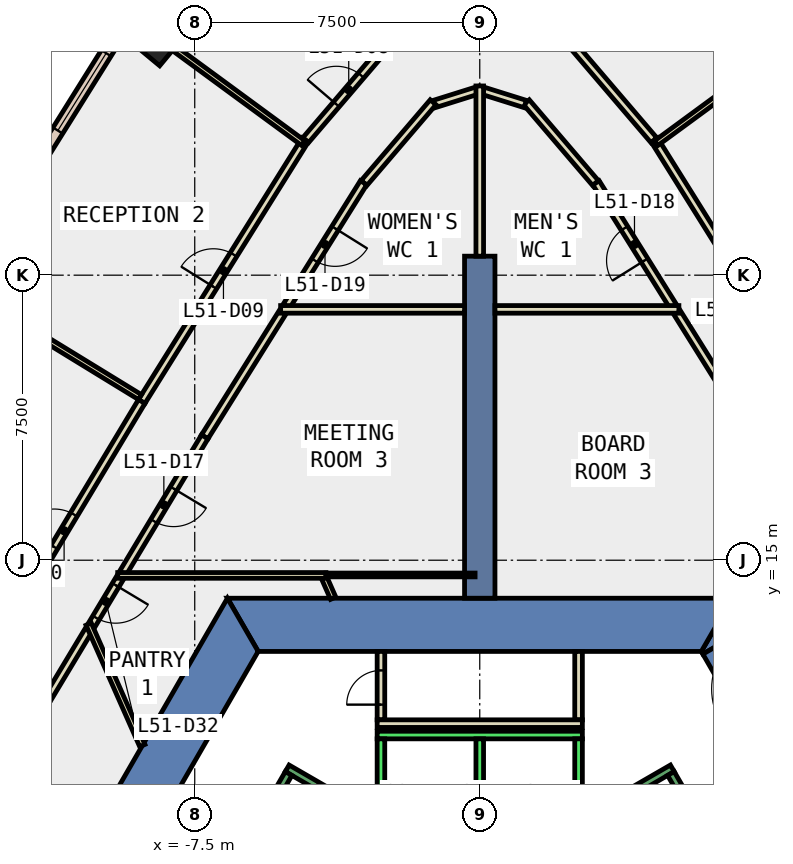
"""IFC4 building model, lengths in metres.
Left out: names, types, materials, properties, quantities, classifications, styles, units other than length and angle.
Written with IfcOpenShell. Run it as: python <this file> out.ifc"""

import sys

from ifc_helpers import new_model, si_unit, direction, frame, frame_2d, origin, origin_2d, place, context, subcontext, project, spatial, polyline, rectangle, outline, extrude, element, fill, save


model = new_model("IFC4")
c1 = context("Model", 3, precision=1e-05, world=origin(), true_north=direction((0.0, 1.0)))
c2 = subcontext(c1, "Body", "Model", "MODEL_VIEW")
j1 = project(units=[si_unit("LENGTHUNIT", "METRE"), si_unit("PLANEANGLEUNIT", "RADIAN")], contexts=[c1])
p1 = place(None, origin())
s1 = spatial("IfcSite", under=j1, at=p1, CompositionType="ELEMENT")
p2 = place(p1, origin())
s2 = spatial("IfcBuilding", under=s1, at=p2, CompositionType="ELEMENT")
p3 = place(p2, frame((0.0, 0.0, 227.6)))
s3 = spatial("IfcBuildingStorey", under=s2, at=p3, CompositionType="ELEMENT", Elevation=227.6)
p4 = place(p3, frame((-8.642, 28.842, -0.4), z_axis=(0.0, 0.0, 1.0), x_axis=(0.638660382845, 0.769488736359, 0.0)))
e1 = element("IfcColumn", 1, at=p4, inside=s3, PredefinedType="COLUMN", context=c2, shape_type="SweptSolid", body=[
    extrude(rectangle(XDim=1.0, YDim=1.4, at=origin_2d()), origin(), (0.0, 0.0, 1.0), 4.2),
])
p5 = place(p3, frame((0.0, 0.0, -0.4)))
e2 = element("IfcWall", 2, at=p5, inside=s3, PredefinedType="SHEAR", context=c2, shape_type="SweptSolid", body=[
    extrude(outline(polyline([(5.871, 12.53), (7.084, 13.23), (6.64, 14.0), (5.831, 12.6), (5.871, 12.53)])), origin(), (0.0, 0.0, 1.0), 4.2),
])
p6 = place(p3, frame((0.0, 0.0, 3.6)))
e3 = element("IfcWall", 3, at=p6, inside=s3, PredefinedType="SHEAR", context=c2, shape_type="SweptSolid", body=[
    extrude(outline(polyline([(7.084, 13.23), (5.871, 12.53), (6.871, 10.798), (8.084, 11.498), (7.084, 13.23)])), origin(), (0.0, 0.0, 1.0), 0.2),
])
p7 = place(p3, frame((0.0, 0.0, -0.4)))
e4 = element("IfcWall", 4, at=p7, inside=s3, PredefinedType="SHEAR", context=c2, shape_type="SweptSolid", body=[
    extrude(outline(polyline([(6.64, 14.0), (-6.64, 14.0), (-5.831, 12.6), (5.831, 12.6), (6.64, 14.0)])), origin(), (0.0, 0.0, 1.0), 4.2),
])
p8 = place(p3, frame((0.0, 0.0, -0.4)))
e5 = element("IfcWall", 5, at=p8, inside=s3, PredefinedType="SHEAR", context=c2, shape_type="SweptSolid", body=[
    extrude(outline(polyline([(-11.834, 5.002), (-10.622, 4.302), (-5.831, 12.6), (-6.64, 14.0), (-11.834, 5.002)])), origin(), (0.0, 0.0, 1.0), 4.2),
])
p9 = place(p3, frame((0.0, 14.0, -0.4), z_axis=(0.0, 0.0, 1.0), x_axis=(0.0, 1.0, 0.0)))
e6 = element("IfcWall", 6, at=p9, inside=s3, PredefinedType="SHEAR", context=c2, shape_type="SweptSolid", body=[
    extrude(rectangle(XDim=9.0, YDim=0.8, at=frame_2d((4.5, 0.0))), origin(), (0.0, 0.0, 1.0), 4.2),
])
p10 = place(p3, frame((-9.485, 28.893, 0.0), z_axis=(0.0, 0.0, 1.0), x_axis=(-0.530037467052, -0.847974223383, 0.0)))
e7 = element("IfcWall", 7, at=p10, inside=s3, PredefinedType="STANDARD", context=c2, shape_type="SweptSolid", body=[
    extrude(rectangle(XDim=7.405, YDim=0.3, at=frame_2d((3.702, 0.0))), origin(), (0.0, 0.0, 1.0), 3.8),
])
p11 = place(p10, frame((0.651, 0.0, 0.9)))
e8 = element("IfcOpeningElement", 8, at=p11, cuts=e7, PredefinedType="OPENING", context=c2, shape_type="SweptSolid", body=[
    extrude(rectangle(XDim=2.4, YDim=2.6, at=frame_2d((1.2, 1.3))), frame((0.0, 0.16, 0.0), z_axis=(0.0, -1.0, 0.0), x_axis=(1.0, 0.0, 0.0)), (0.0, 0.0, 1.0), 0.32),
])
p12 = place(p10, frame((4.354, 0.0, 0.9)))
e9 = element("IfcOpeningElement", 9, at=p12, cuts=e7, PredefinedType="OPENING", context=c2, shape_type="SweptSolid", body=[
    extrude(rectangle(XDim=2.4, YDim=2.6, at=frame_2d((1.2, 1.3))), frame((0.0, 0.16, 0.0), z_axis=(0.0, -1.0, 0.0), x_axis=(1.0, 0.0, 0.0)), (0.0, 0.0, 1.0), 0.32),
])
p13 = place(p3, frame((-9.466, 14.536, 0.0), z_axis=(0.0, 0.0, 1.0), x_axis=(-0.514545292, -0.857463201823, 0.0)))
e10 = element("IfcWall", 10, at=p13, inside=s3, PredefinedType="PARTITIONING", context=c2, shape_type="SweptSolid", body=[
    extrude(rectangle(XDim=1.449, YDim=0.2, at=frame_2d((0.725, 0.0))), origin(), (0.0, 0.0, 1.0), 3.8),
])
p14 = place(p13, frame((0.225, 0.0, 0.0)))
e11 = element("IfcOpeningElement", 11, at=p14, cuts=e10, PredefinedType="OPENING", context=c2, shape_type="SweptSolid", body=[
    extrude(rectangle(XDim=1.0, YDim=2.1, at=frame_2d((0.5, 1.05))), frame((0.0, 0.11, 0.0), z_axis=(0.0, -1.0, 0.0), x_axis=(1.0, 0.0, 0.0)), (0.0, 0.0, 1.0), 0.22),
])
p15 = place(p3, frame((-10.29, 13.164, 0.0), z_axis=(0.0, 0.0, 1.0), x_axis=(-0.514904735811, -0.857247404802, 0.0)))
e12 = element("IfcWall", 12, at=p15, inside=s3, PredefinedType="PARTITIONING", context=c2, shape_type="SweptSolid", body=[
    extrude(rectangle(XDim=2.194, YDim=0.2, at=frame_2d((1.097, 0.0))), origin(), (0.0, 0.0, 1.0), 3.8),
])
for number, where, z_axis, x_axis in (
    (13, (7.237, 18.246, 0.0), (0.0, 0.0, 1.0), (-0.53, 0.848, 0.0)),
    (14, (-5.193, 21.515, 0.0), (0.0, 0.0, 1.0), (-0.53, -0.848, 0.0)),
):
    element("IfcWall", number, at=place(p3, frame(where, z_axis=z_axis, x_axis=x_axis)), inside=s3, PredefinedType="PARTITIONING", context=c2, shape_type="SweptSolid", body=[
        extrude(rectangle(XDim=3.855, YDim=0.2, at=frame_2d((1.928, 0.0))), origin(), (0.0, 0.0, 1.0), 3.8),
    ])
p16 = place(p3, frame((-7.237, 18.246, 0.0), z_axis=(0.0, 0.0, 1.0), x_axis=(-0.514959644878, -0.857214421336, 0.0)))
e15 = element("IfcWall", 15, at=p16, inside=s3, PredefinedType="PARTITIONING", context=c2, shape_type="SweptSolid", body=[
    extrude(rectangle(XDim=4.179, YDim=0.2, at=frame_2d((2.089, 0.0))), origin(), (0.0, 0.0, 1.0), 3.8),
])
p17 = place(p16, frame((1.589, 0.0, 0.0)))
e16 = element("IfcOpeningElement", 16, at=p17, cuts=e15, PredefinedType="OPENING", context=c2, shape_type="SweptSolid", body=[
    extrude(rectangle(XDim=1.0, YDim=2.1, at=frame_2d((0.5, 1.05))), frame((0.0, 0.11, 0.0), z_axis=(0.0, -1.0, 0.0), x_axis=(1.0, 0.0, 0.0)), (0.0, 0.0, 1.0), 0.22),
])
p18 = place(p3, frame((5.087, 21.685, 0.0), z_axis=(0.0, 0.0, 1.0), x_axis=(-0.529998940003, 0.847998304005, 0.0)))
e17 = element("IfcWall", 17, at=p18, inside=s3, PredefinedType="PARTITIONING", context=c2, shape_type="SweptSolid", body=[
    extrude(rectangle(XDim=3.83, YDim=0.2, at=frame_2d((1.915, 0.0))), origin(), (0.0, 0.0, 1.0), 3.8),
])
p19 = place(p18, frame((1.416, 0.0, 0.0)))
e18 = element("IfcOpeningElement", 18, at=p19, cuts=e17, PredefinedType="OPENING", context=c2, shape_type="SweptSolid", body=[
    extrude(rectangle(XDim=1.0, YDim=2.1, at=frame_2d((0.5, 1.05))), frame((0.0, 0.11, 0.0), z_axis=(0.0, -1.0, 0.0), x_axis=(1.0, 0.0, 0.0)), (0.0, 0.0, 1.0), 0.22),
])
p20 = place(p3, frame((3.045, 24.925, 0.0), z_axis=(0.0, 0.0, 1.0), x_axis=(-0.650057725157, 0.759884829407, 0.0)))
e19 = element("IfcWall", 19, at=p20, inside=s3, PredefinedType="PARTITIONING", context=c2, shape_type="SweptSolid", body=[
    extrude(rectangle(XDim=2.796, YDim=0.2, at=frame_2d((1.398, 0.0))), origin(), (0.0, 0.0, 1.0), 3.8),
])
p21 = place(p3, frame((1.196, 27.004, 0.0), z_axis=(0.0, 0.0, 1.0), x_axis=(-0.954200976086, 0.29916633707, 0.0)))
e20 = element("IfcWall", 20, at=p21, inside=s3, PredefinedType="PARTITIONING", context=c2, shape_type="SweptSolid", body=[
    extrude(rectangle(XDim=1.154, YDim=0.2, at=frame_2d((0.577, 0.0))), origin(), (0.0, 0.0, 1.0), 3.8),
])
p22 = place(p3, frame((0.0, 27.379, 0.0), z_axis=(0.0, 0.0, 1.0), x_axis=(-0.954198830916, -0.299173179075, 0.0)))
e21 = element("IfcWall", 21, at=p22, inside=s3, PredefinedType="PARTITIONING", context=c2, shape_type="SweptSolid", body=[
    extrude(rectangle(XDim=1.253, YDim=0.2, at=frame_2d((0.627, 0.0))), origin(), (0.0, 0.0, 1.0), 3.8),
])
p23 = place(p3, frame((-1.227, 27.05, 0.0), z_axis=(0.0, 0.0, 1.0), x_axis=(-0.650057725157, -0.759884829407, 0.0)))
e22 = element("IfcWall", 22, at=p23, inside=s3, PredefinedType="PARTITIONING", context=c2, shape_type="SweptSolid", body=[
    extrude(rectangle(XDim=2.796, YDim=0.2, at=frame_2d((1.398, 0.0))), origin(), (0.0, 0.0, 1.0), 3.8),
])
p24 = place(p3, frame((-3.057, 24.933, 0.0), z_axis=(0.0, 0.0, 1.0), x_axis=(-0.529998940003, -0.847998304005, 0.0)))
e23 = element("IfcWall", 23, at=p24, inside=s3, PredefinedType="PARTITIONING", context=c2, shape_type="SweptSolid", body=[
    extrude(rectangle(XDim=3.83, YDim=0.2, at=frame_2d((1.915, 0.0))), origin(), (0.0, 0.0, 1.0), 3.8),
])
p25 = place(p24, frame((1.416, 0.0, 0.0)))
e24 = element("IfcOpeningElement", 24, at=p25, cuts=e23, PredefinedType="OPENING", context=c2, shape_type="SweptSolid", body=[
    extrude(rectangle(XDim=1.0, YDim=2.1, at=frame_2d((0.5, 1.05))), frame((0.0, 0.11, 0.0), z_axis=(0.0, -1.0, 0.0), x_axis=(1.0, 0.0, 0.0)), (0.0, 0.0, 1.0), 0.22),
])
p26 = place(p3, frame((4.593, 26.061, 0.0), z_axis=(0.0, 0.0, 1.0), x_axis=(0.530012579093, -0.847989779421, 0.0)))
e25 = element("IfcWall", 25, at=p26, inside=s3, PredefinedType="PARTITIONING", context=c2, shape_type="SweptSolid", body=[
    extrude(rectangle(XDim=8.045, YDim=0.2, at=frame_2d((4.022, 0.0))), origin(), (0.0, 0.0, 1.0), 3.8),
])
p27 = place(p26, frame((3.522, 0.0, 0.0)))
e26 = element("IfcOpeningElement", 26, at=p27, cuts=e25, PredefinedType="OPENING", context=c2, shape_type="SweptSolid", body=[
    extrude(rectangle(XDim=1.0, YDim=2.1, at=frame_2d((0.5, 1.05))), frame((0.0, 0.11, 0.0), z_axis=(0.0, -1.0, 0.0), x_axis=(1.0, 0.0, 0.0)), (0.0, 0.0, 1.0), 0.22),
])
p28 = place(p3, frame((-4.581, 26.052, 0.0), z_axis=(0.0, 0.0, 1.0), x_axis=(0.650040973726, 0.759899159413, 0.0)))
e27 = element("IfcWall", 27, at=p28, inside=s3, PredefinedType="PARTITIONING", context=c2, shape_type="SweptSolid", body=[
    extrude(rectangle(XDim=3.485, YDim=0.2, at=frame_2d((1.742, 0.0))), origin(), (0.0, 0.0, 1.0), 3.8),
])
p29 = place(p28, frame((1.243, 0.0, 0.0)))
e28 = element("IfcOpeningElement", 28, at=p29, cuts=e27, PredefinedType="OPENING", context=c2, shape_type="SweptSolid", body=[
    extrude(rectangle(XDim=1.0, YDim=2.1, at=frame_2d((0.5, 1.05))), frame((0.0, 0.11, 0.0), z_axis=(0.0, -1.0, 0.0), x_axis=(1.0, 0.0, 0.0)), (0.0, 0.0, 1.0), 0.22),
])
p30 = place(p3, frame((2.316, 28.7, 0.0), z_axis=(0.0, 0.0, 1.0), x_axis=(0.650040973726, -0.759899159413, 0.0)))
e29 = element("IfcWall", 29, at=p30, inside=s3, PredefinedType="PARTITIONING", context=c2, shape_type="SweptSolid", body=[
    extrude(rectangle(XDim=3.485, YDim=0.2, at=frame_2d((1.742, 0.0))), origin(), (0.0, 0.0, 1.0), 3.8),
])
p31 = place(p3, frame((-8.896, 19.176, 0.0), z_axis=(0.0, 0.0, 1.0), x_axis=(0.529985425286, 0.848006750553, 0.0)))
e30 = element("IfcWall", 30, at=p31, inside=s3, PredefinedType="PARTITIONING", context=c2, shape_type="SweptSolid", body=[
    extrude(rectangle(XDim=8.119, YDim=0.2, at=frame_2d((4.06, 0.0))), origin(), (0.0, 0.0, 1.0), 3.8),
])
p32 = place(p31, frame((3.56, 0.0, 0.0)))
e31 = element("IfcOpeningElement", 31, at=p32, cuts=e30, PredefinedType="OPENING", context=c2, shape_type="SweptSolid", body=[
    extrude(rectangle(XDim=1.0, YDim=2.1, at=frame_2d((0.5, 1.05))), frame((0.0, 0.11, 0.0), z_axis=(0.0, -1.0, 0.0), x_axis=(1.0, 0.0, 0.0)), (0.0, 0.0, 1.0), 0.22),
])
p33 = place(p3, frame((-13.057, 12.247, 0.0), z_axis=(0.0, 0.0, 1.0), x_axis=(0.51490435266, 0.857247634941, 0.0)))
e32 = element("IfcWall", 32, at=p33, inside=s3, PredefinedType="PARTITIONING", context=c2, shape_type="SweptSolid", body=[
    extrude(rectangle(XDim=8.083, YDim=0.2, at=frame_2d((4.042, 0.0))), origin(), (0.0, 0.0, 1.0), 3.8),
])
p34 = place(p33, frame((3.616, 0.0, 0.0)))
e33 = element("IfcOpeningElement", 33, at=p34, cuts=e32, PredefinedType="OPENING", context=c2, shape_type="SweptSolid", body=[
    extrude(rectangle(XDim=1.0, YDim=2.1, at=frame_2d((0.5, 1.05))), frame((0.0, 0.11, 0.0), z_axis=(0.0, -1.0, 0.0), x_axis=(1.0, 0.0, 0.0)), (0.0, 0.0, 1.0), 0.22),
])
p35 = place(p3, frame((-2.6, 10.8, 0.0), z_axis=(0.0, 0.0, 1.0), x_axis=(0.0, 1.0, 0.0)))
e34 = element("IfcWall", 34, at=p35, inside=s3, PredefinedType="PARTITIONING", context=c2, shape_type="SweptSolid", body=[
    extrude(rectangle(XDim=1.8, YDim=0.2, at=frame_2d((0.9, 0.0))), origin(), (0.0, 0.0, 1.0), 3.8),
])
p36 = place(p35, frame((0.4, 0.0, 0.0)))
e35 = element("IfcOpeningElement", 35, at=p36, cuts=e34, PredefinedType="OPENING", context=c2, shape_type="SweptSolid", body=[
    extrude(rectangle(XDim=0.9, YDim=2.1, at=frame_2d((0.45, 1.05))), frame((0.0, 0.11, 0.0), z_axis=(0.0, -1.0, 0.0), x_axis=(1.0, 0.0, 0.0)), (0.0, 0.0, 1.0), 0.22),
])
p37 = place(p3, frame((2.6, 12.6, 0.0), z_axis=(0.0, 0.0, 1.0), x_axis=(0.0, -1.0, 0.0)))
e36 = element("IfcWall", 36, at=p37, inside=s3, PredefinedType="PARTITIONING", context=c2, shape_type="SweptSolid", body=[
    extrude(rectangle(XDim=1.8, YDim=0.2, at=frame_2d((0.9, 0.0))), origin(), (0.0, 0.0, 1.0), 3.8),
])
p38 = place(p3, frame((2.7, 10.7, 0.0), z_axis=(0.0, 0.0, 1.0), x_axis=(-1.0, 0.0, 0.0)))
e37 = element("IfcWall", 37, at=p38, inside=s3, PredefinedType="PARTITIONING", context=c2, shape_type="SweptSolid", body=[
    extrude(rectangle(XDim=5.4, YDim=0.2, at=frame_2d((2.7, 0.0))), origin(), (0.0, 0.0, 1.0), 3.8),
])
p39 = place(p3, frame((-8.879, 10.123, 0.0), z_axis=(0.0, 0.0, 1.0), x_axis=(-0.404271206787, 0.914639159102, 0.0)))
e38 = element("IfcWall", 38, at=p39, inside=s3, PredefinedType="PARTITIONING", context=c2, shape_type="SweptSolid", body=[
    extrude(rectangle(XDim=3.495, YDim=0.15, at=frame_2d((1.748, 0.0))), origin(), (0.0, 0.0, 1.0), 3.8),
])
p40 = place(p3, frame((-3.857, 14.0, 0.0), z_axis=(0.0, 0.0, 1.0), x_axis=(-0.403443407317, 0.915004599493, 0.0)))
e39 = element("IfcWall", 39, at=p40, inside=s3, PredefinedType="PARTITIONING", context=c2, shape_type="SweptSolid", body=[
    extrude(rectangle(XDim=0.58, YDim=0.15, at=frame_2d((0.29, 0.0))), origin(), (0.0, 0.0, 1.0), 3.8),
])
p41 = place(p3, frame((-4.047, 14.6, 0.0), z_axis=(0.0, 0.0, 1.0), x_axis=(-1.0, 0.0, 0.0)))
e40 = element("IfcWall", 40, at=p41, inside=s3, PredefinedType="PARTITIONING", context=c2, shape_type="SweptSolid", body=[
    extrude(rectangle(XDim=5.48, YDim=0.15, at=frame_2d((2.74, 0.0))), origin(), (0.0, 0.0, 1.0), 3.8),
])
p42 = place(p3, frame((-4.047, 14.612, 0.0), z_axis=(0.0, 0.0, 1.0), x_axis=(1.0, 0.0, 0.0)))
e41 = element("IfcWall", 41, at=p42, inside=s3, PredefinedType="PARTITIONING", context=c2, shape_type="SweptSolid", body=[
    extrude(rectangle(XDim=3.924, YDim=0.1, at=frame_2d((1.962, 0.0))), origin(), (0.0, 0.0, 1.0), 3.8),
])
for number, where, z_axis, x_axis in (
    (42, (0.4, 21.6, 0.0), (0.0, 0.0, 1.0), (1.0, 0.0, 0.0)),
    (43, (-5.24, 21.6, 0.0), (0.0, 0.0, 1.0), (1.0, 0.0, 0.0)),
):
    element("IfcWall", number, at=place(p3, frame(where, z_axis=z_axis, x_axis=x_axis)), inside=s3, PredefinedType="PARTITIONING", context=c2, shape_type="SweptSolid", body=[
        extrude(rectangle(XDim=4.84, YDim=0.2, at=frame_2d((2.42, 0.0))), origin(), (0.0, 0.0, 1.0), 3.8),
    ])
p43 = place(p3, frame((0.0, 23.0, 0.0), z_axis=(0.0, 0.0, 1.0), x_axis=(0.0, 1.0, 0.0)))
e44 = element("IfcWall", 44, at=p43, inside=s3, PredefinedType="PARTITIONING", context=c2, shape_type="SweptSolid", body=[
    extrude(rectangle(XDim=4.479, YDim=0.2, at=frame_2d((2.24, 0.0))), origin(), (0.0, 0.0, 1.0), 3.8),
])
for number, where, z_axis, x_axis in (
    (45, (4.646, 25.976, 0.0), (0.0, 0.0, 1.0), (0.806, 0.592, 0.0)),
    (46, (-4.646, 25.976, 0.0), (0.0, 0.0, 1.0), (-0.806, 0.592, 0.0)),
):
    element("IfcWall", number, at=place(p3, frame(where, z_axis=z_axis, x_axis=x_axis)), inside=s3, PredefinedType="PARTITIONING", context=c2, shape_type="SweptSolid", body=[
        extrude(rectangle(XDim=4.193, YDim=0.15, at=frame_2d((2.096, 0.0))), origin(), (0.0, 0.0, 1.0), 3.8),
    ])
p44 = place(p3, frame((-8.942, 19.292, 0.0), z_axis=(0.0, 0.0, 1.0), x_axis=(-0.85273109234, 0.522350154739, 0.0)))
e47 = element("IfcWall", 47, at=p44, inside=s3, PredefinedType="PARTITIONING", context=c2, shape_type="SweptSolid", body=[
    extrude(rectangle(XDim=4.08, YDim=0.15, at=frame_2d((2.04, 0.0))), origin(), (0.0, 0.0, 1.0), 3.8),
])
p45 = place(p3, frame((2.7, 10.4, 0.0), z_axis=(0.0, 0.0, 1.0), x_axis=(-1.0, 0.0, 0.0)))
e48 = element("IfcWall", 48, at=p45, inside=s3, PredefinedType="STANDARD", context=c2, shape_type="SweptSolid", body=[
    extrude(rectangle(XDim=5.4, YDim=0.2, at=frame_2d((2.7, 0.0))), origin(), (0.0, 0.0, 1.0), 3.8),
])
for number, where, z_axis, x_axis in (
    (49, (2.6, 7.9, 0.0), (0.0, 0.0, 1.0), (0.0, 1.0, 0.0)),
    (50, (0.0, 7.9, 0.0), (0.0, 0.0, 1.0), (0.0, 1.0, 0.0)),
    (51, (-2.6, 7.9, 0.0), (0.0, 0.0, 1.0), (0.0, 1.0, 0.0)),
):
    element("IfcWall", number, at=place(p3, frame(where, z_axis=z_axis, x_axis=x_axis)), inside=s3, PredefinedType="STANDARD", context=c2, shape_type="SweptSolid", body=[
        extrude(rectangle(XDim=2.4, YDim=0.2, at=frame_2d((1.2, 0.0))), origin(), (0.0, 0.0, 1.0), 3.8),
    ])
p46 = place(p3, frame((2.7, 8.158, 0.0), z_axis=(0.0, 0.0, 1.0), x_axis=(0.86611865017, 0.499838457731, 0.0)))
e52 = element("IfcWall", 52, at=p46, inside=s3, PredefinedType="STANDARD", context=c2, shape_type="SweptSolid", body=[
    extrude(rectangle(XDim=2.733, YDim=0.2, at=frame_2d((1.366, 0.0))), origin(), (0.0, 0.0, 1.0), 3.8),
])
p47 = place(p3, frame((8.48, 3.412, 0.0), z_axis=(0.0, 0.0, 1.0), x_axis=(-0.499978703459, 0.866037698999, 0.0)))
e53 = element("IfcWall", 53, at=p47, inside=s3, PredefinedType="STANDARD", context=c2, shape_type="SweptSolid", body=[
    extrude(rectangle(XDim=6.9, YDim=0.2, at=frame_2d((3.45, 0.0))), origin(), (0.0, 0.0, 1.0), 3.8),
])
p48 = place(p3, frame((-1.256, 7.324, 0.0), z_axis=(0.0, 0.0, 1.0), x_axis=(-0.866046073146, 0.499964197906, 0.0)))
e54 = element("IfcWall", 54, at=p48, inside=s3, PredefinedType="STANDARD", context=c2, shape_type="SweptSolid", body=[
    extrude(rectangle(XDim=4.4, YDim=0.2, at=frame_2d((2.2, 0.0))), origin(), (0.0, 0.0, 1.0), 3.8),
])
p49 = place(p48, frame((2.4, 0.0, 0.0)))
e55 = element("IfcOpeningElement", 55, at=p49, cuts=e54, PredefinedType="OPENING", context=c2, shape_type="SweptSolid", body=[
    extrude(rectangle(XDim=1.1, YDim=2.2, at=frame_2d((0.55, 1.1))), frame((0.0, 0.11, 0.0), z_axis=(0.0, -1.0, 0.0), x_axis=(1.0, 0.0, 0.0)), (0.0, 0.0, 1.0), 0.22),
])
p50 = place(p3, frame((-5.03, 9.388, 0.0), z_axis=(0.0, 0.0, 1.0), x_axis=(-0.499978703459, -0.866037698999, 0.0)))
e56 = element("IfcWall", 56, at=p50, inside=s3, PredefinedType="STANDARD", context=c2, shape_type="SweptSolid", body=[
    extrude(rectangle(XDim=6.9, YDim=0.2, at=frame_2d((3.45, 0.0))), origin(), (0.0, 0.0, 1.0), 3.8),
])
p51 = place(p11, origin())
e57 = element("IfcWindow", 57, at=p51, inside=s3, PartitioningType="SINGLE_PANEL", PredefinedType="WINDOW", context=c2, shape_type="SweptSolid", body=[
    extrude(rectangle(XDim=2.4, YDim=2.6, at=frame_2d((1.2, 1.3))), frame((0.0, 0.03, 0.0), z_axis=(0.0, -1.0, 0.0), x_axis=(1.0, 0.0, 0.0)), (0.0, 0.0, 1.0), 0.06),
])
fill(e8, e57)
p52 = place(p29, origin())
e58 = element("IfcDoor", 58, at=p52, inside=s3, OperationType="SINGLE_SWING_LEFT", PredefinedType="DOOR", context=c2, shape_type="SweptSolid", body=[
    extrude(rectangle(XDim=1.0, YDim=2.1, at=frame_2d((0.5, 1.05))), frame((0.0, 0.025, 0.0), z_axis=(0.0, -1.0, 0.0), x_axis=(1.0, 0.0, 0.0)), (0.0, 0.0, 1.0), 0.05),
])
fill(e28, e58)
p53 = place(p32, origin())
e59 = element("IfcDoor", 59, at=p53, inside=s3, OperationType="SINGLE_SWING_LEFT", PredefinedType="DOOR", context=c2, shape_type="SweptSolid", body=[
    extrude(rectangle(XDim=1.0, YDim=2.1, at=frame_2d((0.5, 1.05))), frame((0.0, 0.025, 0.0), z_axis=(0.0, -1.0, 0.0), x_axis=(1.0, 0.0, 0.0)), (0.0, 0.0, 1.0), 0.05),
])
fill(e31, e59)
p54 = place(p34, origin())
e60 = element("IfcDoor", 60, at=p54, inside=s3, OperationType="SINGLE_SWING_RIGHT", PredefinedType="DOOR", context=c2, shape_type="SweptSolid", body=[
    extrude(rectangle(XDim=1.0, YDim=2.1, at=frame_2d((0.5, 1.05))), frame((0.0, 0.025, 0.0), z_axis=(0.0, -1.0, 0.0), x_axis=(1.0, 0.0, 0.0)), (0.0, 0.0, 1.0), 0.05),
])
fill(e33, e60)
p55 = place(p17, origin())
e61 = element("IfcDoor", 61, at=p55, inside=s3, OperationType="SINGLE_SWING_LEFT", PredefinedType="DOOR", context=c2, shape_type="SweptSolid", body=[
    extrude(rectangle(XDim=1.0, YDim=2.1, at=frame_2d((0.5, 1.05))), frame((0.0, 0.025, 0.0), z_axis=(0.0, -1.0, 0.0), x_axis=(1.0, 0.0, 0.0)), (0.0, 0.0, 1.0), 0.05),
])
fill(e16, e61)
p56 = place(p19, origin())
e62 = element("IfcDoor", 62, at=p56, inside=s3, OperationType="SINGLE_SWING_LEFT", PredefinedType="DOOR", context=c2, shape_type="SweptSolid", body=[
    extrude(rectangle(XDim=1.0, YDim=2.1, at=frame_2d((0.5, 1.05))), frame((0.0, 0.025, 0.0), z_axis=(0.0, -1.0, 0.0), x_axis=(1.0, 0.0, 0.0)), (0.0, 0.0, 1.0), 0.05),
])
fill(e18, e62)
p57 = place(p25, origin())
e63 = element("IfcDoor", 63, at=p57, inside=s3, OperationType="SINGLE_SWING_LEFT", PredefinedType="DOOR", context=c2, shape_type="SweptSolid", body=[
    extrude(rectangle(XDim=1.0, YDim=2.1, at=frame_2d((0.5, 1.05))), frame((0.0, 0.025, 0.0), z_axis=(0.0, -1.0, 0.0), x_axis=(1.0, 0.0, 0.0)), (0.0, 0.0, 1.0), 0.05),
])
fill(e24, e63)
p58 = place(p36, origin())
e64 = element("IfcDoor", 64, at=p58, inside=s3, OperationType="SINGLE_SWING_RIGHT", PredefinedType="DOOR", context=c2, shape_type="SweptSolid", body=[
    extrude(rectangle(XDim=0.9, YDim=2.1, at=frame_2d((0.45, 1.05))), frame((0.0, 0.025, 0.0), z_axis=(0.0, -1.0, 0.0), x_axis=(1.0, 0.0, 0.0)), (0.0, 0.0, 1.0), 0.05),
])
fill(e35, e64)
p59 = place(p14, origin())
e65 = element("IfcDoor", 65, at=p59, inside=s3, OperationType="SINGLE_SWING_RIGHT", PredefinedType="DOOR", context=c2, shape_type="SweptSolid", body=[
    extrude(rectangle(XDim=1.0, YDim=2.1, at=frame_2d((0.5, 1.05))), frame((0.0, 0.025, 0.0), z_axis=(0.0, -1.0, 0.0), x_axis=(1.0, 0.0, 0.0)), (0.0, 0.0, 1.0), 0.05),
])
fill(e11, e65)
save(model, sys.argv[1])
